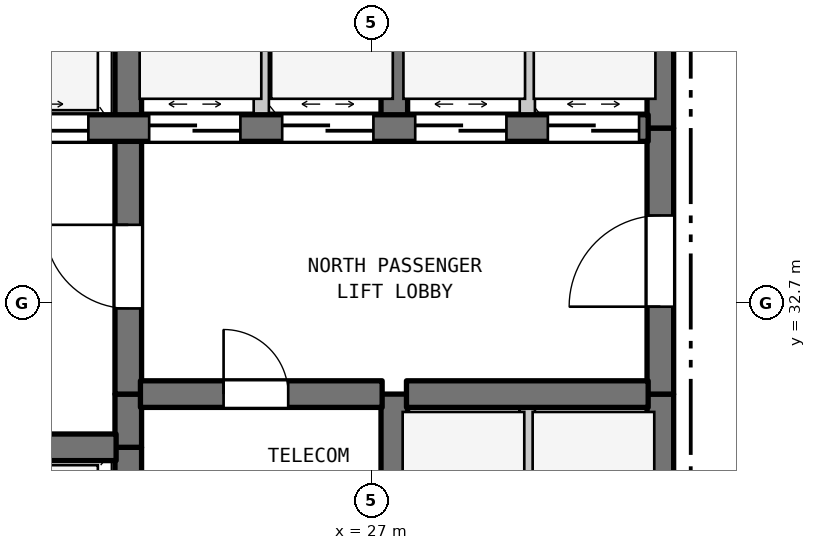
"""IFC4 building model, lengths in metres.
Left out: names, types, materials, properties, quantities, classifications, styles, units other than length and angle.
Written with IfcOpenShell. Run it as: python <this file> out.ifc"""

import sys

from ifc_helpers import new_model, si_unit, direction, frame, frame_2d, origin, place, context, subcontext, project, spatial, rectangle, extrude, element, fill, save


model = new_model("IFC4")
c1 = context("Model", 3, precision=1e-05, world=origin(), true_north=direction((0.0, 1.0)))
c2 = subcontext(c1, "Body", "Model", "MODEL_VIEW")
j1 = project(units=[si_unit("LENGTHUNIT", "METRE"), si_unit("PLANEANGLEUNIT", "RADIAN")], contexts=[c1])
p1 = place(None, origin())
s1 = spatial("IfcSite", under=j1, at=p1, CompositionType="ELEMENT")
p2 = place(p1, origin())
s2 = spatial("IfcBuilding", under=s1, at=p2, CompositionType="ELEMENT")
p3 = place(p2, frame((0.0, 0.0, 65.6)))
s3 = spatial("IfcBuildingStorey", under=s2, at=p3, CompositionType="ELEMENT", Elevation=65.6)
p4 = place(p3, frame((23.8, 29.5, 0.0), z_axis=(0.0, 0.0, 1.0), x_axis=(0.0, 1.0, 0.0)))
e1 = element("IfcWall", 1, at=p4, inside=s3, PredefinedType="SHEAR", context=c2, shape_type="SweptSolid", body=[
    extrude(rectangle(XDim=1.3, YDim=0.35, at=frame_2d((0.65, 0.0))), origin(), (0.0, 0.0, 1.0), 4.185),
])
p5 = place(p3, frame((23.8, 30.8, 0.0), z_axis=(0.0, 0.0, 1.0), x_axis=(0.0, 1.0, 0.0)))
e2 = element("IfcWall", 2, at=p5, inside=s3, PredefinedType="SHEAR", context=c2, shape_type="SweptSolid", body=[
    extrude(rectangle(XDim=0.7, YDim=0.35, at=frame_2d((0.35, 0.0))), origin(), (0.0, 0.0, 1.0), 4.185),
])
p6 = place(p3, frame((23.8, 31.5, 0.0), z_axis=(0.0, 0.0, 1.0), x_axis=(0.0, 1.0, 0.0)))
e3 = element("IfcWall", 3, at=p6, inside=s3, PredefinedType="SHEAR", context=c2, shape_type="SweptSolid", body=[
    extrude(rectangle(XDim=3.5, YDim=0.35, at=frame_2d((1.75, 0.0))), origin(), (0.0, 0.0, 1.0), 4.185),
])
p7 = place(p6, frame((1.127, 0.0, 0.0)))
e4 = element("IfcOpeningElement", 4, at=p7, cuts=e3, PredefinedType="OPENING", context=c2, shape_type="SweptSolid", body=[
    extrude(rectangle(XDim=1.1, YDim=2.15, at=frame_2d((0.55, 1.075))), frame((0.0, 0.185, 0.0), z_axis=(0.0, -1.0, 0.0), x_axis=(1.0, 0.0, 0.0)), (0.0, 0.0, 1.0), 0.37),
])
p8 = place(p3, frame((23.8, 35.0, 0.0), z_axis=(0.0, 0.0, 1.0), x_axis=(0.0, 1.0, 0.0)))
e5 = element("IfcWall", 5, at=p8, inside=s3, PredefinedType="SHEAR", context=c2, shape_type="SweptSolid", body=[
    extrude(rectangle(XDim=2.9, YDim=0.35, at=frame_2d((1.45, 0.0))), origin(), (0.0, 0.0, 1.0), 4.185),
])
p9 = place(p3, frame((25.55, 35.0, 0.0), z_axis=(0.0, 0.0, 1.0), x_axis=(0.0, 1.0, 0.0)))
e6 = element("IfcWall", 6, at=p9, inside=s3, PredefinedType="STANDARD", context=c2, shape_type="SweptSolid", body=[
    extrude(rectangle(XDim=2.9, YDim=0.2, at=frame_2d((1.45, 0.0))), origin(), (0.0, 0.0, 1.0), 4.185),
])
p10 = place(p3, frame((27.3, 29.5, 0.0), z_axis=(0.0, 0.0, 1.0), x_axis=(0.0, 1.0, 0.0)))
e7 = element("IfcWall", 7, at=p10, inside=s3, PredefinedType="SHEAR", context=c2, shape_type="SweptSolid", body=[
    extrude(rectangle(XDim=2.0, YDim=0.35, at=frame_2d((1.0, 0.0))), origin(), (0.0, 0.0, 1.0), 4.185),
])
p11 = place(p3, frame((27.3, 35.0, 0.0), z_axis=(0.0, 0.0, 1.0), x_axis=(0.0, 1.0, 0.0)))
e8 = element("IfcWall", 8, at=p11, inside=s3, PredefinedType="SHEAR", context=c2, shape_type="SweptSolid", body=[
    extrude(rectangle(XDim=2.9, YDim=0.35, at=frame_2d((1.45, 0.0))), origin(), (0.0, 0.0, 1.0), 4.185),
])
p12 = place(p3, frame((29.05, 28.9, 0.0), z_axis=(0.0, 0.0, 1.0), x_axis=(0.0, 1.0, 0.0)))
e9 = element("IfcWall", 9, at=p12, inside=s3, PredefinedType="STANDARD", context=c2, shape_type="SweptSolid", body=[
    extrude(rectangle(XDim=2.6, YDim=0.2, at=frame_2d((1.3, 0.0))), origin(), (0.0, 0.0, 1.0), 4.185),
])
p13 = place(p3, frame((29.05, 35.0, 0.0), z_axis=(0.0, 0.0, 1.0), x_axis=(0.0, 1.0, 0.0)))
e10 = element("IfcWall", 10, at=p13, inside=s3, PredefinedType="STANDARD", context=c2, shape_type="SweptSolid", body=[
    extrude(rectangle(XDim=2.9, YDim=0.2, at=frame_2d((1.45, 0.0))), origin(), (0.0, 0.0, 1.0), 4.185),
])
p14 = place(p3, frame((30.8, 28.9, 0.0), z_axis=(0.0, 0.0, 1.0), x_axis=(0.0, 1.0, 0.0)))
e11 = element("IfcWall", 11, at=p14, inside=s3, PredefinedType="SHEAR", context=c2, shape_type="SweptSolid", body=[
    extrude(rectangle(XDim=2.6, YDim=0.35, at=frame_2d((1.3, 0.0))), origin(), (0.0, 0.0, 1.0), 4.185),
])
p15 = place(p3, frame((30.8, 31.5, 0.0), z_axis=(0.0, 0.0, 1.0), x_axis=(0.0, 1.0, 0.0)))
e12 = element("IfcWall", 12, at=p15, inside=s3, PredefinedType="SHEAR", context=c2, shape_type="SweptSolid", body=[
    extrude(rectangle(XDim=3.5, YDim=0.35, at=frame_2d((1.75, 0.0))), origin(), (0.0, 0.0, 1.0), 4.185),
])
p16 = place(p15, frame((1.15, 0.0, 0.0)))
e13 = element("IfcOpeningElement", 13, at=p16, cuts=e12, PredefinedType="OPENING", context=c2, shape_type="SweptSolid", body=[
    extrude(rectangle(XDim=1.2, YDim=2.2, at=frame_2d((0.6, 1.1))), frame((0.0, 0.185, 0.0), z_axis=(0.0, -1.0, 0.0), x_axis=(1.0, 0.0, 0.0)), (0.0, 0.0, 1.0), 0.37),
])
p17 = place(p3, frame((30.8, 35.0, 0.0), z_axis=(0.0, 0.0, 1.0), x_axis=(0.0, 1.0, 0.0)))
e14 = element("IfcWall", 14, at=p17, inside=s3, PredefinedType="SHEAR", context=c2, shape_type="SweptSolid", body=[
    extrude(rectangle(XDim=2.9, YDim=0.35, at=frame_2d((1.45, 0.0))), origin(), (0.0, 0.0, 1.0), 4.185),
])
p18 = place(p3, frame((19.16, 30.8, 0.0), z_axis=(0.0, 0.0, 1.0), x_axis=(1.0, 0.0, 0.0)))
e15 = element("IfcWall", 15, at=p18, inside=s3, PredefinedType="SHEAR", context=c2, shape_type="SweptSolid", body=[
    extrude(rectangle(XDim=4.48, YDim=0.35, at=frame_2d((2.24, 0.0))), origin(), (0.0, 0.0, 1.0), 4.185),
])
p19 = place(p3, frame((23.96, 31.5, 0.0), z_axis=(0.0, 0.0, 1.0), x_axis=(1.0, 0.0, 0.0)))
e16 = element("IfcWall", 16, at=p19, inside=s3, PredefinedType="SHEAR", context=c2, shape_type="SweptSolid", body=[
    extrude(rectangle(XDim=3.18, YDim=0.35, at=frame_2d((1.59, 0.0))), origin(), (0.0, 0.0, 1.0), 4.185),
])
p20 = place(p19, frame((1.094, 0.0, 0.0)))
e17 = element("IfcOpeningElement", 17, at=p20, cuts=e16, PredefinedType="OPENING", context=c2, shape_type="SweptSolid", body=[
    extrude(rectangle(XDim=0.85, YDim=2.1, at=frame_2d((0.425, 1.05))), frame((0.0, 0.185, 0.0), z_axis=(0.0, -1.0, 0.0), x_axis=(1.0, 0.0, 0.0)), (0.0, 0.0, 1.0), 0.37),
])
p21 = place(p3, frame((27.46, 31.5, 0.0), z_axis=(0.0, 0.0, 1.0), x_axis=(1.0, 0.0, 0.0)))
e18 = element("IfcWall", 18, at=p21, inside=s3, PredefinedType="SHEAR", context=c2, shape_type="SweptSolid", body=[
    extrude(rectangle(XDim=3.18, YDim=0.35, at=frame_2d((1.59, 0.0))), origin(), (0.0, 0.0, 1.0), 4.185),
])
p22 = place(p3, frame((19.16, 35.0, 0.0), z_axis=(0.0, 0.0, 1.0), x_axis=(1.0, 0.0, 0.0)))
e19 = element("IfcWall", 19, at=p22, inside=s3, PredefinedType="SHEAR", context=c2, shape_type="SweptSolid", body=[
    extrude(rectangle(XDim=11.48, YDim=0.35, at=frame_2d((5.74, 0.0))), origin(), (0.0, 0.0, 1.0), 4.185),
])
p23 = place(p22, frame((0.365, 0.0, 0.0)))
e20 = element("IfcOpeningElement", 20, at=p23, cuts=e19, PredefinedType="OPENING", context=c2, shape_type="SweptSolid", body=[
    extrude(rectangle(XDim=1.35, YDim=2.2, at=frame_2d((0.675, 1.1))), frame((0.0, 0.185, 0.0), z_axis=(0.0, -1.0, 0.0), x_axis=(1.0, 0.0, 0.0)), (0.0, 0.0, 1.0), 0.37),
])
p24 = place(p22, frame((2.765, 0.0, 0.0)))
e21 = element("IfcOpeningElement", 21, at=p24, cuts=e19, PredefinedType="OPENING", context=c2, shape_type="SweptSolid", body=[
    extrude(rectangle(XDim=1.35, YDim=2.2, at=frame_2d((0.675, 1.1))), frame((0.0, 0.185, 0.0), z_axis=(0.0, -1.0, 0.0), x_axis=(1.0, 0.0, 0.0)), (0.0, 0.0, 1.0), 0.37),
])
p25 = place(p22, frame((4.915, 0.0, 0.0)))
e22 = element("IfcOpeningElement", 22, at=p25, cuts=e19, PredefinedType="OPENING", context=c2, shape_type="SweptSolid", body=[
    extrude(rectangle(XDim=1.2, YDim=2.2, at=frame_2d((0.6, 1.1))), frame((0.0, 0.185, 0.0), z_axis=(0.0, -1.0, 0.0), x_axis=(1.0, 0.0, 0.0)), (0.0, 0.0, 1.0), 0.37),
])
p26 = place(p22, frame((6.665, 0.0, 0.0)))
e23 = element("IfcOpeningElement", 23, at=p26, cuts=e19, PredefinedType="OPENING", context=c2, shape_type="SweptSolid", body=[
    extrude(rectangle(XDim=1.2, YDim=2.2, at=frame_2d((0.6, 1.1))), frame((0.0, 0.185, 0.0), z_axis=(0.0, -1.0, 0.0), x_axis=(1.0, 0.0, 0.0)), (0.0, 0.0, 1.0), 0.37),
])
p27 = place(p22, frame((8.415, 0.0, 0.0)))
e24 = element("IfcOpeningElement", 24, at=p27, cuts=e19, PredefinedType="OPENING", context=c2, shape_type="SweptSolid", body=[
    extrude(rectangle(XDim=1.2, YDim=2.2, at=frame_2d((0.6, 1.1))), frame((0.0, 0.185, 0.0), z_axis=(0.0, -1.0, 0.0), x_axis=(1.0, 0.0, 0.0)), (0.0, 0.0, 1.0), 0.37),
])
p28 = place(p22, frame((10.16, 0.0, 0.0)))
e25 = element("IfcOpeningElement", 25, at=p28, cuts=e19, PredefinedType="OPENING", context=c2, shape_type="SweptSolid", body=[
    extrude(rectangle(XDim=1.2, YDim=2.2, at=frame_2d((0.6, 1.1))), frame((0.0, 0.185, 0.0), z_axis=(0.0, -1.0, 0.0), x_axis=(1.0, 0.0, 0.0)), (0.0, 0.0, 1.0), 0.37),
])
p29 = place(p7, origin())
e26 = element("IfcDoor", 26, at=p29, inside=s3, OperationType="SINGLE_SWING_RIGHT", PredefinedType="DOOR", context=c2, shape_type="SweptSolid", body=[
    extrude(rectangle(XDim=1.1, YDim=2.15, at=frame_2d((0.55, 1.075))), frame((0.0, 0.025, 0.0), z_axis=(0.0, -1.0, 0.0), x_axis=(1.0, 0.0, 0.0)), (0.0, 0.0, 1.0), 0.05),
])
fill(e4, e26)
p30 = place(p16, origin())
e27 = element("IfcDoor", 27, at=p30, inside=s3, OperationType="SINGLE_SWING_LEFT", PredefinedType="DOOR", context=c2, shape_type="SweptSolid", body=[
    extrude(rectangle(XDim=1.2, YDim=2.2, at=frame_2d((0.6, 1.1))), frame((0.0, 0.025, 0.0), z_axis=(0.0, -1.0, 0.0), x_axis=(1.0, 0.0, 0.0)), (0.0, 0.0, 1.0), 0.05),
])
fill(e13, e27)
p31 = place(p20, origin())
e28 = element("IfcDoor", 28, at=p31, inside=s3, OperationType="SINGLE_SWING_LEFT", PredefinedType="DOOR", context=c2, shape_type="SweptSolid", body=[
    extrude(rectangle(XDim=0.85, YDim=2.1, at=frame_2d((0.425, 1.05))), frame((0.0, 0.025, 0.0), z_axis=(0.0, -1.0, 0.0), x_axis=(1.0, 0.0, 0.0)), (0.0, 0.0, 1.0), 0.05),
])
fill(e17, e28)
p32 = place(p24, origin())
e29 = element("IfcDoor", 29, at=p32, inside=s3, OperationType="DOUBLE_DOOR_SLIDING", PredefinedType="DOOR", context=c2, shape_type="SweptSolid", body=[
    extrude(rectangle(XDim=1.35, YDim=2.2, at=frame_2d((0.675, 1.1))), frame((0.0, 0.025, 0.0), z_axis=(0.0, -1.0, 0.0), x_axis=(1.0, 0.0, 0.0)), (0.0, 0.0, 1.0), 0.05),
])
fill(e21, e29)
p33 = place(p25, origin())
e30 = element("IfcDoor", 30, at=p33, inside=s3, OperationType="DOUBLE_DOOR_SLIDING", PredefinedType="DOOR", context=c2, shape_type="SweptSolid", body=[
    extrude(rectangle(XDim=1.2, YDim=2.2, at=frame_2d((0.6, 1.1))), frame((0.0, 0.025, 0.0), z_axis=(0.0, -1.0, 0.0), x_axis=(1.0, 0.0, 0.0)), (0.0, 0.0, 1.0), 0.05),
])
fill(e22, e30)
p34 = place(p26, origin())
e31 = element("IfcDoor", 31, at=p34, inside=s3, OperationType="DOUBLE_DOOR_SLIDING", PredefinedType="DOOR", context=c2, shape_type="SweptSolid", body=[
    extrude(rectangle(XDim=1.2, YDim=2.2, at=frame_2d((0.6, 1.1))), frame((0.0, 0.025, 0.0), z_axis=(0.0, -1.0, 0.0), x_axis=(1.0, 0.0, 0.0)), (0.0, 0.0, 1.0), 0.05),
])
fill(e23, e31)
p35 = place(p27, origin())
e32 = element("IfcDoor", 32, at=p35, inside=s3, OperationType="DOUBLE_DOOR_SLIDING", PredefinedType="DOOR", context=c2, shape_type="SweptSolid", body=[
    extrude(rectangle(XDim=1.2, YDim=2.2, at=frame_2d((0.6, 1.1))), frame((0.0, 0.025, 0.0), z_axis=(0.0, -1.0, 0.0), x_axis=(1.0, 0.0, 0.0)), (0.0, 0.0, 1.0), 0.05),
])
fill(e24, e32)
p36 = place(p28, origin())
e33 = element("IfcDoor", 33, at=p36, inside=s3, OperationType="DOUBLE_DOOR_SLIDING", PredefinedType="DOOR", context=c2, shape_type="SweptSolid", body=[
    extrude(rectangle(XDim=1.2, YDim=2.2, at=frame_2d((0.6, 1.1))), frame((0.0, 0.025, 0.0), z_axis=(0.0, -1.0, 0.0), x_axis=(1.0, 0.0, 0.0)), (0.0, 0.0, 1.0), 0.05),
])
fill(e25, e33)
save(model, sys.argv[1])
